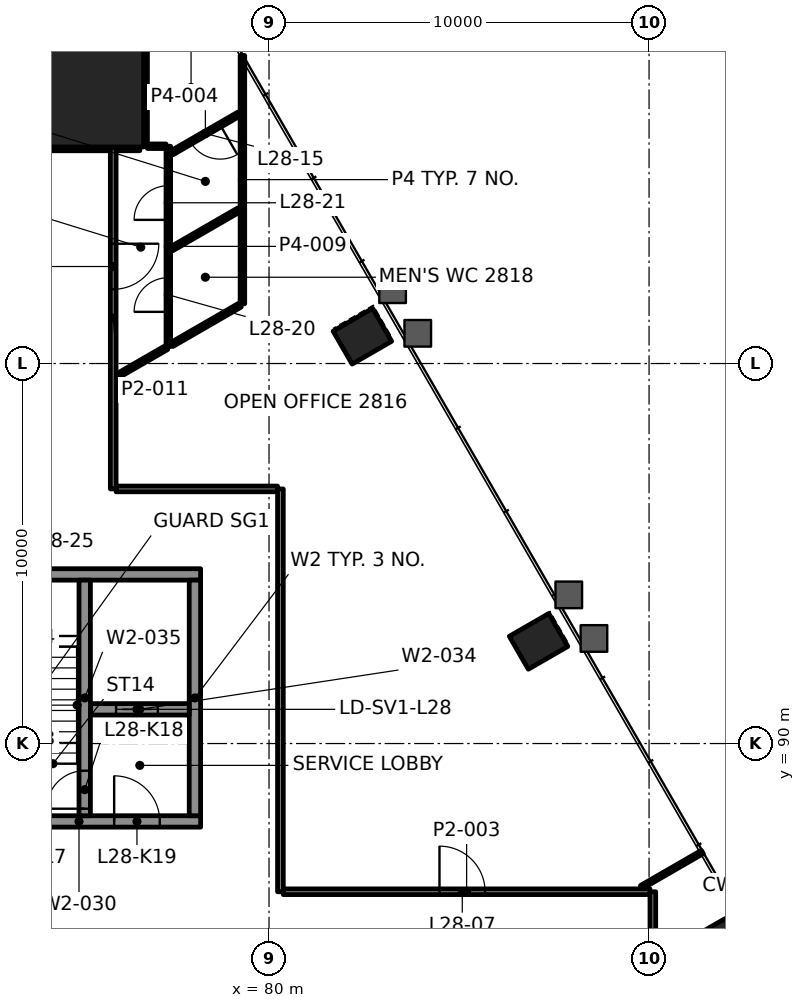
"""IFC4 building model, lengths in metres.
Left out: names, types, materials, properties, quantities, classifications, styles, units other than length and angle.
Written with IfcOpenShell. Run it as: python <this file> out.ifc"""

import sys

from ifc_helpers import new_model, si_unit, direction, frame, frame_2d, origin, origin_2d, place, context, subcontext, project, spatial, rectangle, extrude, element, fill, save


model = new_model("IFC4")
c1 = context("Model", 3, precision=1e-05, world=origin(), true_north=direction((0.0, 1.0)))
c2 = subcontext(c1, "Body", "Model", "MODEL_VIEW")
j1 = project(units=[si_unit("LENGTHUNIT", "METRE"), si_unit("PLANEANGLEUNIT", "RADIAN")], contexts=[c1])
p1 = place(None, origin())
s1 = spatial("IfcSite", under=j1, at=p1, CompositionType="ELEMENT")
p2 = place(p1, origin())
s2 = spatial("IfcBuilding", under=s1, at=p2, CompositionType="ELEMENT")
p3 = place(p2, frame((0.0, 0.0, 124.0)))
s3 = spatial("IfcBuildingStorey", under=s2, at=p3, CompositionType="ELEMENT", Elevation=124.0)
p4 = place(p3, frame((75.0, 107.399, 0.0), z_axis=(0.0, 0.0, 1.0), x_axis=(-1.0, 0.0, 0.0)))
e1 = element("IfcColumn", 1, at=p4, inside=s3, PredefinedType="COLUMN", context=c2, shape_type="SweptSolid", body=[
    extrude(rectangle(XDim=3.4, YDim=3.4, at=origin_2d()), origin(), (0.0, 0.0, 1.0), 4.2),
])
for number, where, z_axis, x_axis in (
    (2, (91.729, 84.658, -0.0), (0.0, 0.0, 1.0), (-0.5, 0.866, 0.0)),
    (3, (87.093, 92.688, -0.0), (0.0, 0.0, 1.0), (-0.5, 0.866, 0.0)),
    (4, (82.457, 100.719, -0.0), (0.0, 0.0, 1.0), (-0.5, 0.866, 0.0)),
):
    element("IfcColumn", number, at=place(p3, frame(where, z_axis=z_axis, x_axis=x_axis)), inside=s3, PredefinedType="COLUMN", context=c2, shape_type="SweptSolid", body=[
        extrude(rectangle(XDim=1.0, YDim=1.2, at=origin_2d()), origin(), (0.0, 0.0, 1.0), 4.2),
    ])
p5 = place(p3, frame((71.8, 87.95, 0.0), z_axis=(0.0, 0.0, 1.0), x_axis=(1.0, 0.0, 0.0)))
e5 = element("IfcWall", 5, at=p5, inside=s3, PredefinedType="SHEAR", context=c2, shape_type="SweptSolid", body=[
    extrude(rectangle(XDim=6.4, YDim=0.3, at=frame_2d((3.2, 0.0))), origin(), (0.0, 0.0, 1.0), 4.0),
])
p6 = place(p5, frame((1.325, 0.0, 0.0)))
e6 = element("IfcOpeningElement", 6, at=p6, cuts=e5, PredefinedType="OPENING", context=c2, shape_type="SweptSolid", body=[
    extrude(rectangle(XDim=1.0, YDim=2.1, at=frame_2d((0.5, 1.05))), frame((0.0, 0.16, 0.0), z_axis=(0.0, -1.0, 0.0), x_axis=(1.0, 0.0, 0.0)), (0.0, 0.0, 1.0), 0.32),
])
p7 = place(p5, frame((4.125, 0.0, 0.0)))
e7 = element("IfcOpeningElement", 7, at=p7, cuts=e5, PredefinedType="OPENING", context=c2, shape_type="SweptSolid", body=[
    extrude(rectangle(XDim=1.2, YDim=2.1, at=frame_2d((0.6, 1.05))), frame((0.0, 0.16, 0.0), z_axis=(0.0, -1.0, 0.0), x_axis=(1.0, 0.0, 0.0)), (0.0, 0.0, 1.0), 0.32),
])
p8 = place(p3, frame((71.8, 94.45, 0.0), z_axis=(0.0, 0.0, 1.0), x_axis=(1.0, 0.0, 0.0)))
e8 = element("IfcWall", 8, at=p8, inside=s3, PredefinedType="SHEAR", context=c2, shape_type="SweptSolid", body=[
    extrude(rectangle(XDim=6.4, YDim=0.3, at=frame_2d((3.2, 0.0))), origin(), (0.0, 0.0, 1.0), 4.0),
])
p9 = place(p3, frame((78.05, 88.1, 0.0), z_axis=(0.0, 0.0, 1.0), x_axis=(0.0, 1.0, 0.0)))
e9 = element("IfcWall", 9, at=p9, inside=s3, PredefinedType="SHEAR", context=c2, shape_type="SweptSolid", body=[
    extrude(rectangle(XDim=6.2, YDim=0.3, at=frame_2d((3.1, 0.0))), origin(), (0.0, 0.0, 1.0), 4.0),
])
p10 = place(p3, frame((75.3, 90.9, 0.0), z_axis=(0.0, 0.0, 1.0), x_axis=(1.0, 0.0, 0.0)))
e10 = element("IfcWall", 10, at=p10, inside=s3, PredefinedType="SHEAR", context=c2, shape_type="SweptSolid", body=[
    extrude(rectangle(XDim=2.6, YDim=0.3, at=frame_2d((1.3, 0.0))), origin(), (0.0, 0.0, 1.0), 4.0),
])
p11 = place(p10, frame((0.675, 0.0, 0.0)))
e11 = element("IfcOpeningElement", 11, at=p11, cuts=e10, PredefinedType="OPENING", context=c2, shape_type="SweptSolid", body=[
    extrude(rectangle(XDim=1.1, YDim=2.1, at=frame_2d((0.55, 1.05))), frame((0.0, 0.16, 0.0), z_axis=(0.0, -1.0, 0.0), x_axis=(1.0, 0.0, 0.0)), (0.0, 0.0, 1.0), 0.32),
])
p12 = place(p3, frame((75.15, 88.1, 0.0), z_axis=(0.0, 0.0, 1.0), x_axis=(0.0, 1.0, 0.0)))
e12 = element("IfcWall", 12, at=p12, inside=s3, PredefinedType="SHEAR", context=c2, shape_type="SweptSolid", body=[
    extrude(rectangle(XDim=6.2, YDim=0.3, at=frame_2d((3.1, 0.0))), origin(), (0.0, 0.0, 1.0), 4.0),
])
p13 = place(p12, frame((0.185, 0.0, 0.0)))
e13 = element("IfcOpeningElement", 13, at=p13, cuts=e12, PredefinedType="OPENING", context=c2, shape_type="SweptSolid", body=[
    extrude(rectangle(XDim=1.0, YDim=2.1, at=frame_2d((0.5, 1.05))), frame((0.0, 0.16, 0.0), z_axis=(0.0, -1.0, 0.0), x_axis=(1.0, 0.0, 0.0)), (0.0, 0.0, 1.0), 0.32),
])
p14 = place(p3, frame((80.375, 86.1, 0.0), z_axis=(0.0, 0.0, 1.0), x_axis=(1.0, 0.0, 0.0)))
e14 = element("IfcWall", 14, at=p14, inside=s3, PredefinedType="PARTITIONING", context=c2, shape_type="SweptSolid", body=[
    extrude(rectangle(XDim=9.649, YDim=0.15, at=frame_2d((4.825, 0.0))), origin(), (0.0, 0.0, 1.0), 3.4),
])
p15 = place(p14, frame((4.11, 0.0, 0.0)))
e15 = element("IfcOpeningElement", 15, at=p15, cuts=e14, PredefinedType="OPENING", context=c2, shape_type="SweptSolid", body=[
    extrude(rectangle(XDim=1.2, YDim=2.1, at=frame_2d((0.6, 1.05))), frame((0.0, 0.085, 0.0), z_axis=(0.0, -1.0, 0.0), x_axis=(1.0, 0.0, 0.0)), (0.0, 0.0, 1.0), 0.17),
])
p16 = place(p3, frame((75.975, 96.7, 0.0), z_axis=(0.0, 0.0, 1.0), x_axis=(1.0, 0.0, 0.0)))
e16 = element("IfcWall", 16, at=p16, inside=s3, PredefinedType="PARTITIONING", context=c2, shape_type="SweptSolid", body=[
    extrude(rectangle(XDim=4.249, YDim=0.15, at=frame_2d((2.125, 0.0))), origin(), (0.0, 0.0, 1.0), 3.4),
])
p17 = place(p3, frame((74.176, 105.699, 0.0), z_axis=(0.0, 0.0, 1.0), x_axis=(1.0, 0.0, 0.0)))
e17 = element("IfcWall", 17, at=p17, inside=s3, PredefinedType="PARTITIONING", context=c2, shape_type="SweptSolid", body=[
    extrude(rectangle(XDim=1.649, YDim=0.2, at=frame_2d((0.825, 0.0))), origin(), (0.0, 0.0, 1.0), 3.397),
])
p18 = place(p3, frame((76.8, 105.718, 0.0), z_axis=(0.0, 0.0, 1.0), x_axis=(1.0, 0.0, 0.0)))
e18 = element("IfcWall", 18, at=p18, inside=s3, PredefinedType="PARTITIONING", context=c2, shape_type="SweptSolid", body=[
    extrude(rectangle(XDim=0.49, YDim=0.12, at=frame_2d((0.245, 0.0))), origin(), (0.0, 0.0, 1.0), 3.4),
])
p19 = place(p3, frame((89.797, 86.22, 0.0), z_axis=(0.0, 0.0, 1.0), x_axis=(0.866036320872, 0.499981090573, 0.0)))
e19 = element("IfcWall", 19, at=p19, inside=s3, PredefinedType="PARTITIONING", context=c2, shape_type="SweptSolid", body=[
    extrude(rectangle(XDim=1.852, YDim=0.1, at=frame_2d((0.926, 0.0))), origin(), (0.0, 0.0, 1.0), 3.165),
])
p20 = place(p3, frame((76.01, 99.673, 0.0), z_axis=(0.0, 0.0, 1.0), x_axis=(0.865943626461, 0.500141615736, 0.0)))
e20 = element("IfcWall", 20, at=p20, inside=s3, PredefinedType="PARTITIONING", context=c2, shape_type="SweptSolid", body=[
    extrude(rectangle(XDim=1.496, YDim=0.12, at=frame_2d((0.748, 0.0))), origin(), (0.0, 0.0, 1.0), 3.4),
])
p21 = place(p3, frame((77.445, 103.024, 0.0), z_axis=(0.0, 0.0, 1.0), x_axis=(0.866039589866, 0.499975428181, 0.0)))
e21 = element("IfcWall", 21, at=p21, inside=s3, PredefinedType="PARTITIONING", context=c2, shape_type="SweptSolid", body=[
    extrude(rectangle(XDim=2.033, YDim=0.12, at=frame_2d((1.016, 0.0))), origin(), (0.0, 0.0, 1.0), 3.4),
])
p22 = place(p3, frame((79.205, 106.562, 0.0), z_axis=(0.0, 0.0, 1.0), x_axis=(-0.866017611601, -0.500013496215, 0.0)))
e22 = element("IfcWall", 22, at=p22, inside=s3, PredefinedType="PARTITIONING", context=c2, shape_type="SweptSolid", body=[
    extrude(rectangle(XDim=2.033, YDim=0.12, at=frame_2d((1.017, 0.0))), origin(), (0.0, 0.0, 1.0), 3.4),
])
p23 = place(p22, frame((0.567, 0.0, 0.0)))
e23 = element("IfcOpeningElement", 23, at=p23, cuts=e22, PredefinedType="OPENING", context=c2, shape_type="SweptSolid", body=[
    extrude(rectangle(XDim=0.9, YDim=2.1, at=frame_2d((0.45, 1.05))), frame((0.0, 0.07, 0.0), z_axis=(0.0, -1.0, 0.0), x_axis=(1.0, 0.0, 0.0)), (0.0, 0.0, 1.0), 0.14),
])
p24 = place(p3, frame((90.1, 86.1, 0.0), z_axis=(0.0, 0.0, 1.0), x_axis=(0.0, -1.0, 0.0)))
e24 = element("IfcWall", 24, at=p24, inside=s3, PredefinedType="PARTITIONING", context=c2, shape_type="SweptSolid", body=[
    extrude(rectangle(XDim=18.778, YDim=0.15, at=frame_2d((9.389, 0.0))), origin(), (0.0, 0.0, 1.0), 3.4),
])
p25 = place(p24, frame((6.196, 0.0, 0.0)))
e25 = element("IfcOpeningElement", 25, at=p25, cuts=e24, PredefinedType="OPENING", context=c2, shape_type="SweptSolid", body=[
    extrude(rectangle(XDim=0.9, YDim=2.1, at=frame_2d((0.45, 1.05))), frame((0.0, 0.085, 0.0), z_axis=(0.0, -1.0, 0.0), x_axis=(1.0, 0.0, 0.0)), (0.0, 0.0, 1.0), 0.17),
])
p26 = place(p24, frame((15.332, 0.0, 0.0)))
e26 = element("IfcOpeningElement", 26, at=p26, cuts=e24, PredefinedType="OPENING", context=c2, shape_type="SweptSolid", body=[
    extrude(rectangle(XDim=1.0, YDim=2.1, at=frame_2d((0.5, 1.05))), frame((0.0, 0.085, 0.0), z_axis=(0.0, -1.0, 0.0), x_axis=(1.0, 0.0, 0.0)), (0.0, 0.0, 1.0), 0.17),
])
p27 = place(p3, frame((80.3, 86.1, 0.0), z_axis=(0.0, 0.0, 1.0), x_axis=(0.0, 1.0, 0.0)))
e27 = element("IfcWall", 27, at=p27, inside=s3, PredefinedType="PARTITIONING", context=c2, shape_type="SweptSolid", body=[
    extrude(rectangle(XDim=10.599, YDim=0.15, at=frame_2d((5.3, 0.0))), origin(), (0.0, 0.0, 1.0), 3.322),
])
p28 = place(p3, frame((79.3, 101.573, 0.0), z_axis=(0.0, 0.0, 1.0), x_axis=(0.0, 1.0, 0.0)))
e28 = element("IfcWall", 28, at=p28, inside=s3, PredefinedType="PARTITIONING", context=c2, shape_type="SweptSolid", body=[
    extrude(rectangle(XDim=6.533, YDim=0.12, at=frame_2d((3.267, 0.0))), origin(), (0.0, 0.0, 1.0), 3.4),
])
p29 = place(p3, frame((77.35, 100.447, 0.0), z_axis=(0.0, 0.0, 1.0), x_axis=(0.0, 1.0, 0.0)))
e29 = element("IfcWall", 29, at=p29, inside=s3, PredefinedType="PARTITIONING", context=c2, shape_type="SweptSolid", body=[
    extrude(rectangle(XDim=5.271, YDim=0.12, at=frame_2d((2.635, 0.0))), origin(), (0.0, 0.0, 1.0), 3.4),
])
p30 = place(p29, frame((0.913, 0.0, 0.0)))
e30 = element("IfcOpeningElement", 30, at=p30, cuts=e29, PredefinedType="OPENING", context=c2, shape_type="SweptSolid", body=[
    extrude(rectangle(XDim=0.9, YDim=2.1, at=frame_2d((0.45, 1.05))), frame((0.0, 0.07, 0.0), z_axis=(0.0, -1.0, 0.0), x_axis=(1.0, 0.0, 0.0)), (0.0, 0.0, 1.0), 0.14),
])
p31 = place(p29, frame((3.333, 0.0, 0.0)))
e31 = element("IfcOpeningElement", 31, at=p31, cuts=e29, PredefinedType="OPENING", context=c2, shape_type="SweptSolid", body=[
    extrude(rectangle(XDim=0.9, YDim=2.1, at=frame_2d((0.45, 1.05))), frame((0.0, 0.07, 0.0), z_axis=(0.0, -1.0, 0.0), x_axis=(1.0, 0.0, 0.0)), (0.0, 0.0, 1.0), 0.14),
])
p32 = place(p3, frame((76.7, 105.715, 0.0), z_axis=(0.0, 0.0, 1.0), x_axis=(0.0, 1.0, 0.0)))
e32 = element("IfcWall", 32, at=p32, inside=s3, PredefinedType="PARTITIONING", context=c2, shape_type="SweptSolid", body=[
    extrude(rectangle(XDim=3.543, YDim=0.2, at=frame_2d((1.772, 0.0))), origin(), (0.0, 0.0, 1.0), 3.4),
])
p33 = place(p3, frame((75.9, 105.698, 0.0), z_axis=(0.0, 0.0, 1.0), x_axis=(0.0, -1.0, 0.0)))
e33 = element("IfcWall", 33, at=p33, inside=s3, PredefinedType="PARTITIONING", context=c2, shape_type="SweptSolid", body=[
    extrude(rectangle(XDim=8.999, YDim=0.15, at=frame_2d((4.499, 0.0))), origin(), (0.0, 0.0, 1.0), 3.4),
])
p34 = place(p33, frame((2.546, 0.0, 0.0)))
e34 = element("IfcOpeningElement", 34, at=p34, cuts=e33, PredefinedType="OPENING", context=c2, shape_type="SweptSolid", body=[
    extrude(rectangle(XDim=1.2, YDim=2.1, at=frame_2d((0.6, 1.05))), frame((0.0, 0.085, 0.0), z_axis=(0.0, -1.0, 0.0), x_axis=(1.0, 0.0, 0.0)), (0.0, 0.0, 1.0), 0.17),
])
p35 = place(p3, frame((75.975, 105.699, 0.0), z_axis=(0.0, 0.0, 1.0), x_axis=(1.0, 0.0, 0.0)))
e35 = element("IfcWall", 35, at=p35, inside=s3, PredefinedType="PARTITIONING", context=c2, shape_type="SweptSolid", body=[
    extrude(rectangle(XDim=0.625, YDim=0.2, at=frame_2d((0.312, 0.0))), origin(), (0.0, 0.0, 1.0), 3.4),
])
p36 = place(p3, frame((77.44, 100.499, 0.0), z_axis=(0.0, 0.0, 1.0), x_axis=(0.865986040326, 0.500068173313, 0.0)))
e36 = element("IfcWall", 36, at=p36, inside=s3, PredefinedType="PARTITIONING", context=c2, shape_type="SweptSolid", body=[
    extrude(rectangle(XDim=2.078, YDim=0.12, at=frame_2d((1.039, 0.0))), origin(), (0.0, 0.0, 1.0), 3.4),
])
p37 = place(p15, origin())
e37 = element("IfcDoor", 37, at=p37, inside=s3, OperationType="DOUBLE_DOOR_SINGLE_SWING", PredefinedType="DOOR", context=c2, shape_type="SweptSolid", body=[
    extrude(rectangle(XDim=1.2, YDim=2.1, at=frame_2d((0.6, 1.05))), frame((0.0, 0.025, 0.0), z_axis=(0.0, -1.0, 0.0), x_axis=(1.0, 0.0, 0.0)), (0.0, 0.0, 1.0), 0.05),
])
fill(e15, e37)
p38 = place(p23, origin())
e38 = element("IfcDoor", 38, at=p38, inside=s3, OperationType="SINGLE_SWING_RIGHT", PredefinedType="DOOR", context=c2, shape_type="SweptSolid", body=[
    extrude(rectangle(XDim=0.9, YDim=2.1, at=frame_2d((0.45, 1.05))), frame((0.0, 0.025, 0.0), z_axis=(0.0, -1.0, 0.0), x_axis=(1.0, 0.0, 0.0)), (0.0, 0.0, 1.0), 0.05),
])
fill(e23, e38)
p39 = place(p30, origin())
e39 = element("IfcDoor", 39, at=p39, inside=s3, OperationType="SINGLE_SWING_LEFT", PredefinedType="DOOR", context=c2, shape_type="SweptSolid", body=[
    extrude(rectangle(XDim=0.9, YDim=2.1, at=frame_2d((0.45, 1.05))), frame((0.0, 0.025, 0.0), z_axis=(0.0, -1.0, 0.0), x_axis=(1.0, 0.0, 0.0)), (0.0, 0.0, 1.0), 0.05),
])
fill(e30, e39)
p40 = place(p31, origin())
e40 = element("IfcDoor", 40, at=p40, inside=s3, OperationType="SINGLE_SWING_RIGHT", PredefinedType="DOOR", context=c2, shape_type="SweptSolid", body=[
    extrude(rectangle(XDim=0.9, YDim=2.1, at=frame_2d((0.45, 1.05))), frame((0.0, 0.025, 0.0), z_axis=(0.0, -1.0, 0.0), x_axis=(1.0, 0.0, 0.0)), (0.0, 0.0, 1.0), 0.05),
])
fill(e31, e40)
p41 = place(p34, origin())
e41 = element("IfcDoor", 41, at=p41, inside=s3, OperationType="DOUBLE_DOOR_SINGLE_SWING", PredefinedType="DOOR", context=c2, shape_type="SweptSolid", body=[
    extrude(rectangle(XDim=1.2, YDim=2.1, at=frame_2d((0.6, 1.05))), frame((0.0, 0.025, 0.0), z_axis=(0.0, -1.0, 0.0), x_axis=(1.0, 0.0, 0.0)), (0.0, 0.0, 1.0), 0.05),
])
fill(e34, e41)
p42 = place(p11, origin())
e42 = element("IfcDoor", 42, at=p42, inside=s3, OperationType="DOUBLE_DOOR_SLIDING", PredefinedType="DOOR", context=c2, shape_type="SweptSolid", body=[
    extrude(rectangle(XDim=1.1, YDim=2.1, at=frame_2d((0.55, 1.05))), frame((0.0, 0.025, 0.0), z_axis=(0.0, -1.0, 0.0), x_axis=(1.0, 0.0, 0.0)), (0.0, 0.0, 1.0), 0.05),
])
fill(e11, e42)
p43 = place(p13, origin())
e43 = element("IfcDoor", 43, at=p43, inside=s3, OperationType="SINGLE_SWING_LEFT", PredefinedType="DOOR", context=c2, shape_type="SweptSolid", body=[
    extrude(rectangle(XDim=1.0, YDim=2.1, at=frame_2d((0.5, 1.05))), frame((0.0, 0.025, 0.0), z_axis=(0.0, -1.0, 0.0), x_axis=(1.0, 0.0, 0.0)), (0.0, 0.0, 1.0), 0.05),
])
fill(e13, e43)
p44 = place(p7, origin())
e44 = element("IfcDoor", 44, at=p44, inside=s3, OperationType="SINGLE_SWING_RIGHT", PredefinedType="DOOR", context=c2, shape_type="SweptSolid", body=[
    extrude(rectangle(XDim=1.2, YDim=2.1, at=frame_2d((0.6, 1.05))), frame((0.0, 0.025, 0.0), z_axis=(0.0, -1.0, 0.0), x_axis=(1.0, 0.0, 0.0)), (0.0, 0.0, 1.0), 0.05),
])
fill(e7, e44)
save(model, sys.argv[1])
